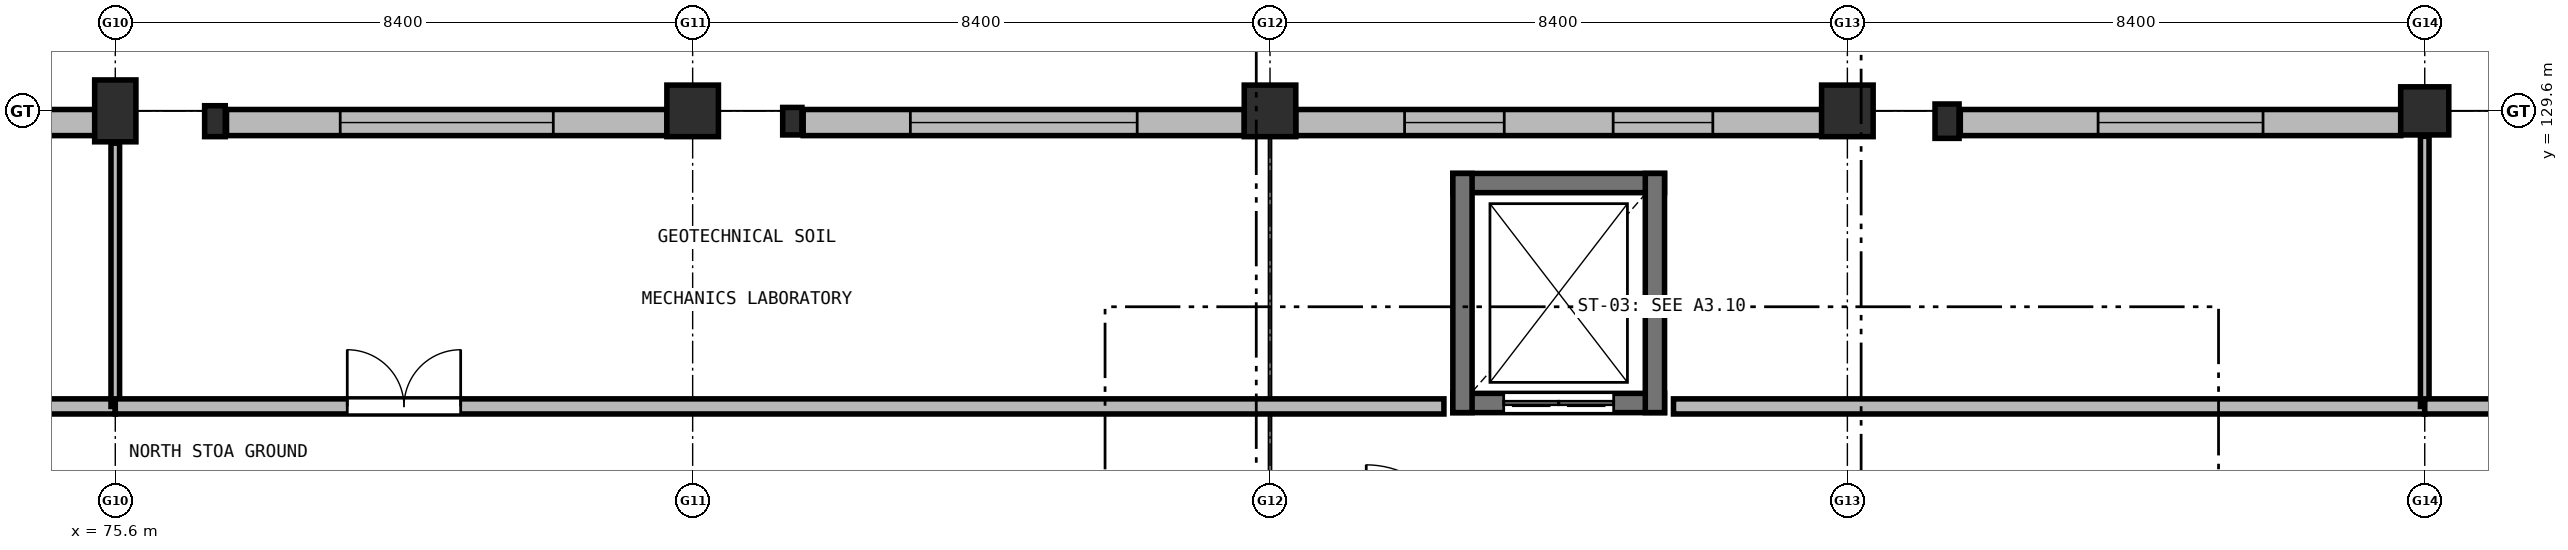
"""IFC4 building model, lengths in metres.
Left out: names, types, materials, properties, quantities, classifications, styles, units other than length and angle.
Written with IfcOpenShell. Run it as: python <this file> out.ifc"""

import sys

from ifc_helpers import new_model, si_unit, direction, frame, frame_2d, origin, origin_2d, place, context, subcontext, project, spatial, rectangle, extrude, element, fill, save


model = new_model("IFC4")
c1 = context("Model", 3, precision=1e-05, world=origin(), true_north=direction((0.0, 1.0)))
c2 = subcontext(c1, "Body", "Model", "MODEL_VIEW")
j1 = project(units=[si_unit("LENGTHUNIT", "METRE"), si_unit("PLANEANGLEUNIT", "RADIAN")], contexts=[c1])
p1 = place(None, origin())
s1 = spatial("IfcSite", under=j1, at=p1, CompositionType="ELEMENT")
p2 = place(p1, origin())
s2 = spatial("IfcBuilding", under=s1, at=p2, CompositionType="ELEMENT")
p3 = place(p2, origin())
s3 = spatial("IfcBuildingStorey", under=s2, at=p3, CompositionType="ELEMENT", Elevation=0.0)
p4 = place(p3, frame((75.6, 129.6, 0.0), z_axis=(0.0, 0.0, 1.0), x_axis=(1.0, 0.0, 0.0)))
e1 = element("IfcColumn", 1, at=p4, inside=s3, PredefinedType="COLUMN", context=c2, shape_type="SweptSolid", body=[
    extrude(rectangle(XDim=0.6, YDim=0.9, at=origin_2d()), origin(), (0.0, 0.0, 1.0), 5.1),
])
for number, where, z_axis, x_axis in (
    (2, (84.0, 129.6, 0.0), (0.0, 0.0, 1.0), (1.0, 0.0, 0.0)),
    (3, (92.4, 129.6, 0.0), (0.0, 0.0, 1.0), (1.0, 0.0, 0.0)),
    (4, (100.8, 129.6, 0.0), (0.0, 0.0, 1.0), (1.0, 0.0, 0.0)),
):
    element("IfcColumn", number, at=place(p3, frame(where, z_axis=z_axis, x_axis=x_axis)), inside=s3, PredefinedType="COLUMN", context=c2, shape_type="SweptSolid", body=[
        extrude(rectangle(XDim=0.75, YDim=0.75, at=origin_2d()), origin(), (0.0, 0.0, 1.0), 5.1),
    ])
p5 = place(p3, frame((109.2, 129.6, 0.0), z_axis=(0.0, 0.0, 1.0), x_axis=(1.0, 0.0, 0.0)))
e5 = element("IfcColumn", 5, at=p5, inside=s3, PredefinedType="COLUMN", context=c2, shape_type="SweptSolid", body=[
    extrude(rectangle(XDim=0.7, YDim=0.7, at=origin_2d()), origin(), (0.0, 0.0, 1.0), 5.1),
])
p6 = place(p3, frame((77.05, 129.45, 0.0), z_axis=(0.0, 0.0, 1.0), x_axis=(1.0, 0.0, 0.0)))
e6 = element("IfcColumn", 6, at=p6, inside=s3, PredefinedType="PILASTER", context=c2, shape_type="SweptSolid", body=[
    extrude(rectangle(XDim=0.3, YDim=0.45, at=origin_2d()), origin(), (0.0, 0.0, 1.0), 4.15),
])
p7 = place(p3, frame((85.45, 129.45, 0.0), z_axis=(0.0, 0.0, 1.0), x_axis=(1.0, 0.0, 0.0)))
e7 = element("IfcColumn", 7, at=p7, inside=s3, PredefinedType="PILASTER", context=c2, shape_type="SweptSolid", body=[
    extrude(rectangle(XDim=0.28, YDim=0.4, at=origin_2d()), origin(), (0.0, 0.0, 1.0), 4.15),
])
p8 = place(p3, frame((102.25, 129.45, 0.0), z_axis=(0.0, 0.0, 1.0), x_axis=(1.0, 0.0, 0.0)))
e8 = element("IfcColumn", 8, at=p8, inside=s3, PredefinedType="PILASTER", context=c2, shape_type="SweptSolid", body=[
    extrude(rectangle(XDim=0.35, YDim=0.5, at=origin_2d()), origin(), (0.0, 0.0, 1.0), 4.15),
])
p9 = place(p3, frame((67.498, 129.43, 0.0), z_axis=(0.0, 0.0, 1.0), x_axis=(1.0, 0.0, 0.0)))
e9 = element("IfcWall", 9, at=p9, inside=s3, PredefinedType="SOLIDWALL", context=c2, shape_type="SweptSolid", body=[
    extrude(rectangle(XDim=7.804, YDim=0.38, at=frame_2d((3.902, 0.0))), origin(), (0.0, 0.0, 1.0), 4.01),
])
p10 = place(p9, frame((2.452, 0.0, 0.95)))
e10 = element("IfcOpeningElement", 10, at=p10, cuts=e9, PredefinedType="OPENING", context=c2, shape_type="SweptSolid", body=[
    extrude(rectangle(XDim=2.9, YDim=1.75, at=frame_2d((1.45, 0.875))), frame((0.0, 0.2, 0.0), z_axis=(0.0, -1.0, 0.0), x_axis=(1.0, 0.0, 0.0)), (0.0, 0.0, 1.0), 0.4),
])
p11 = place(p3, frame((77.218, 129.43, 0.0), z_axis=(0.0, 0.0, 1.0), x_axis=(1.0, 0.0, 0.0)))
e11 = element("IfcWall", 11, at=p11, inside=s3, PredefinedType="SOLIDWALL", context=c2, shape_type="SweptSolid", body=[
    extrude(rectangle(XDim=6.409, YDim=0.38, at=frame_2d((3.205, 0.0))), origin(), (0.0, 0.0, 1.0), 4.01),
])
p12 = place(p11, frame((1.655, 0.0, 0.95)))
e12 = element("IfcOpeningElement", 12, at=p12, cuts=e11, PredefinedType="OPENING", context=c2, shape_type="SweptSolid", body=[
    extrude(rectangle(XDim=3.1, YDim=1.95, at=frame_2d((1.55, 0.975))), frame((0.0, 0.2, 0.0), z_axis=(0.0, -1.0, 0.0), x_axis=(1.0, 0.0, 0.0)), (0.0, 0.0, 1.0), 0.4),
])
p13 = place(p3, frame((85.608, 129.43, 0.0), z_axis=(0.0, 0.0, 1.0), x_axis=(1.0, 0.0, 0.0)))
e13 = element("IfcWall", 13, at=p13, inside=s3, PredefinedType="SOLIDWALL", context=c2, shape_type="SweptSolid", body=[
    extrude(rectangle(XDim=6.419, YDim=0.38, at=frame_2d((3.209, 0.0))), origin(), (0.0, 0.0, 1.0), 4.01),
])
p14 = place(p13, frame((1.56, 0.0, 0.95)))
e14 = element("IfcOpeningElement", 14, at=p14, cuts=e13, PredefinedType="OPENING", context=c2, shape_type="SweptSolid", body=[
    extrude(rectangle(XDim=3.3, YDim=1.65, at=frame_2d((1.65, 0.825))), frame((0.0, 0.2, 0.0), z_axis=(0.0, -1.0, 0.0), x_axis=(1.0, 0.0, 0.0)), (0.0, 0.0, 1.0), 0.4),
])
p15 = place(p3, frame((92.773, 129.43, 0.0), z_axis=(0.0, 0.0, 1.0), x_axis=(1.0, 0.0, 0.0)))
e15 = element("IfcWall", 15, at=p15, inside=s3, PredefinedType="SOLIDWALL", context=c2, shape_type="SweptSolid", body=[
    extrude(rectangle(XDim=7.654, YDim=0.38, at=frame_2d((3.827, 0.0))), origin(), (0.0, 0.0, 1.0), 4.01),
])
p16 = place(p15, frame((1.585, 0.0, 0.95)))
e16 = element("IfcOpeningElement", 16, at=p16, cuts=e15, PredefinedType="OPENING", context=c2, shape_type="SweptSolid", body=[
    extrude(rectangle(XDim=1.45, YDim=1.85, at=frame_2d((0.725, 0.925))), frame((0.0, 0.2, 0.0), z_axis=(0.0, -1.0, 0.0), x_axis=(1.0, 0.0, 0.0)), (0.0, 0.0, 1.0), 0.4),
])
p17 = place(p15, frame((4.619, 0.0, 0.95)))
e17 = element("IfcOpeningElement", 17, at=p17, cuts=e15, PredefinedType="OPENING", context=c2, shape_type="SweptSolid", body=[
    extrude(rectangle(XDim=1.45, YDim=1.85, at=frame_2d((0.725, 0.925))), frame((0.0, 0.2, 0.0), z_axis=(0.0, -1.0, 0.0), x_axis=(1.0, 0.0, 0.0)), (0.0, 0.0, 1.0), 0.4),
])
p18 = place(p3, frame((102.443, 129.43, 0.0), z_axis=(0.0, 0.0, 1.0), x_axis=(1.0, 0.0, 0.0)))
e18 = element("IfcWall", 18, at=p18, inside=s3, PredefinedType="SOLIDWALL", context=c2, shape_type="SweptSolid", body=[
    extrude(rectangle(XDim=6.409, YDim=0.38, at=frame_2d((3.205, 0.0))), origin(), (0.0, 0.0, 1.0), 4.01),
])
p19 = place(p18, frame((2.004, 0.0, 0.95)))
e19 = element("IfcOpeningElement", 19, at=p19, cuts=e18, PredefinedType="OPENING", context=c2, shape_type="SweptSolid", body=[
    extrude(rectangle(XDim=2.4, YDim=2.1, at=frame_2d((1.2, 1.05))), frame((0.0, 0.2, 0.0), z_axis=(0.0, -1.0, 0.0), x_axis=(1.0, 0.0, 0.0)), (0.0, 0.0, 1.0), 0.4),
])
p20 = place(p3, frame((98.14, 125.35, 0.0), z_axis=(0.0, 0.0, 1.0), x_axis=(-1.0, 0.0, 0.0)))
e20 = element("IfcWall", 20, at=p20, inside=s3, PredefinedType="SHEAR", context=c2, shape_type="SweptSolid", body=[
    extrude(rectangle(XDim=3.08, YDim=0.28, at=frame_2d((1.54, 0.0))), origin(), (0.0, 0.0, 1.0), 4.82),
])
p21 = place(p20, frame((0.74, 0.0, 0.0)))
e21 = element("IfcOpeningElement", 21, at=p21, cuts=e20, PredefinedType="OPENING", context=c2, shape_type="SweptSolid", body=[
    extrude(rectangle(XDim=1.6, YDim=2.2, at=frame_2d((0.8, 1.1))), frame((0.0, 0.15, 0.0), z_axis=(0.0, -1.0, 0.0), x_axis=(1.0, 0.0, 0.0)), (0.0, 0.0, 1.0), 0.3),
])
p22 = place(p3, frame((95.06, 128.55, 0.0), z_axis=(0.0, 0.0, 1.0), x_axis=(1.0, 0.0, 0.0)))
e22 = element("IfcWall", 22, at=p22, inside=s3, PredefinedType="SHEAR", context=c2, shape_type="SweptSolid", body=[
    extrude(rectangle(XDim=3.08, YDim=0.28, at=frame_2d((1.54, 0.0))), origin(), (0.0, 0.0, 1.0), 4.82),
])
for number, where, z_axis, x_axis in (
    (23, (95.2, 125.21, 0.0), (0.0, 0.0, 1.0), (0.0, 1.0, 0.0)),
    (24, (98.0, 128.69, 0.0), (0.0, 0.0, 1.0), (0.0, -1.0, 0.0)),
):
    element("IfcWall", number, at=place(p3, frame(where, z_axis=z_axis, x_axis=x_axis)), inside=s3, PredefinedType="SHEAR", context=c2, shape_type="SweptSolid", body=[
        extrude(rectangle(XDim=3.48, YDim=0.28, at=frame_2d((1.74, 0.0))), origin(), (0.0, 0.0, 1.0), 4.82),
    ])
p23 = place(p3, frame((56.07, 125.3, 0.0), z_axis=(0.0, 0.0, 1.0), x_axis=(1.0, 0.0, 0.0)))
e25 = element("IfcWall", 25, at=p23, inside=s3, PredefinedType="SOLIDWALL", context=c2, shape_type="SweptSolid", body=[
    extrude(rectangle(XDim=19.53, YDim=0.22, at=frame_2d((9.765, 0.0))), origin(), (0.0, 0.0, 1.0), 4.105),
])
p24 = place(p3, frame((75.6, 125.3, 0.0), z_axis=(0.0, 0.0, 1.0), x_axis=(0.0, 1.0, 0.0)))
e26 = element("IfcWall", 26, at=p24, inside=s3, PredefinedType="PARTITIONING", context=c2, shape_type="SweptSolid", body=[
    extrude(rectangle(XDim=3.83, YDim=0.125, at=frame_2d((1.915, 0.0))), origin(), (0.0, 0.0, 1.0), 4.105),
])
p25 = place(p3, frame((75.6, 125.3, 0.0), z_axis=(0.0, 0.0, 1.0), x_axis=(1.0, 0.0, 0.0)))
e27 = element("IfcWall", 27, at=p25, inside=s3, PredefinedType="SOLIDWALL", context=c2, shape_type="SweptSolid", body=[
    extrude(rectangle(XDim=19.33, YDim=0.22, at=frame_2d((9.665, 0.0))), origin(), (0.0, 0.0, 1.0), 4.105),
])
p26 = place(p25, frame((3.375, 0.0, 0.0)))
e28 = element("IfcOpeningElement", 28, at=p26, cuts=e27, PredefinedType="OPENING", context=c2, shape_type="SweptSolid", body=[
    extrude(rectangle(XDim=1.65, YDim=2.2, at=frame_2d((0.825, 1.1))), frame((0.0, 0.12, 0.0), z_axis=(0.0, -1.0, 0.0), x_axis=(1.0, 0.0, 0.0)), (0.0, 0.0, 1.0), 0.24),
])
p27 = place(p3, frame((98.27, 125.3, 0.0), z_axis=(0.0, 0.0, 1.0), x_axis=(1.0, 0.0, 0.0)))
e29 = element("IfcWall", 29, at=p27, inside=s3, PredefinedType="SOLIDWALL", context=c2, shape_type="SweptSolid", body=[
    extrude(rectangle(XDim=10.93, YDim=0.22, at=frame_2d((5.465, 0.0))), origin(), (0.0, 0.0, 1.0), 4.105),
])
p28 = place(p3, frame((109.2, 125.3, 0.0), z_axis=(0.0, 0.0, 1.0), x_axis=(0.0, 1.0, 0.0)))
e30 = element("IfcWall", 30, at=p28, inside=s3, PredefinedType="PARTITIONING", context=c2, shape_type="SweptSolid", body=[
    extrude(rectangle(XDim=3.93, YDim=0.125, at=frame_2d((1.965, 0.0))), origin(), (0.0, 0.0, 1.0), 4.005),
])
p29 = place(p3, frame((109.2, 125.3, 0.0), z_axis=(0.0, 0.0, 1.0), x_axis=(1.0, 0.0, 0.0)))
e31 = element("IfcWall", 31, at=p29, inside=s3, PredefinedType="SOLIDWALL", context=c2, shape_type="SweptSolid", body=[
    extrude(rectangle(XDim=24.98, YDim=0.22, at=frame_2d((12.49, 0.0))), origin(), (0.0, 0.0, 1.0), 4.105),
])
p30 = place(p29, frame((3.55, 0.0, 0.0)))
e32 = element("IfcOpeningElement", 32, at=p30, cuts=e31, PredefinedType="OPENING", context=c2, shape_type="SweptSolid", body=[
    extrude(rectangle(XDim=1.3, YDim=2.15, at=frame_2d((0.65, 1.075))), frame((0.0, 0.12, 0.0), z_axis=(0.0, -1.0, 0.0), x_axis=(1.0, 0.0, 0.0)), (0.0, 0.0, 1.0), 0.24),
])
p31 = place(p12, origin())
e33 = element("IfcWindow", 33, at=p31, inside=s3, PartitioningType="SINGLE_PANEL", PredefinedType="WINDOW", context=c2, shape_type="SweptSolid", body=[
    extrude(rectangle(XDim=3.1, YDim=1.95, at=frame_2d((1.55, 0.975))), frame((0.0, 0.03, 0.0), z_axis=(0.0, -1.0, 0.0), x_axis=(1.0, 0.0, 0.0)), (0.0, 0.0, 1.0), 0.06),
])
fill(e12, e33)
p32 = place(p14, origin())
e34 = element("IfcWindow", 34, at=p32, inside=s3, PartitioningType="SINGLE_PANEL", PredefinedType="WINDOW", context=c2, shape_type="SweptSolid", body=[
    extrude(rectangle(XDim=3.3, YDim=1.65, at=frame_2d((1.65, 0.825))), frame((0.0, 0.03, 0.0), z_axis=(0.0, -1.0, 0.0), x_axis=(1.0, 0.0, 0.0)), (0.0, 0.0, 1.0), 0.06),
])
fill(e14, e34)
p33 = place(p16, origin())
e35 = element("IfcWindow", 35, at=p33, inside=s3, PartitioningType="SINGLE_PANEL", PredefinedType="WINDOW", context=c2, shape_type="SweptSolid", body=[
    extrude(rectangle(XDim=1.45, YDim=1.85, at=frame_2d((0.725, 0.925))), frame((0.0, 0.03, 0.0), z_axis=(0.0, -1.0, 0.0), x_axis=(1.0, 0.0, 0.0)), (0.0, 0.0, 1.0), 0.06),
])
fill(e16, e35)
p34 = place(p17, origin())
e36 = element("IfcWindow", 36, at=p34, inside=s3, PartitioningType="SINGLE_PANEL", PredefinedType="WINDOW", context=c2, shape_type="SweptSolid", body=[
    extrude(rectangle(XDim=1.45, YDim=1.85, at=frame_2d((0.725, 0.925))), frame((0.0, 0.03, 0.0), z_axis=(0.0, -1.0, 0.0), x_axis=(1.0, 0.0, 0.0)), (0.0, 0.0, 1.0), 0.06),
])
fill(e17, e36)
p35 = place(p19, origin())
e37 = element("IfcWindow", 37, at=p35, inside=s3, PartitioningType="SINGLE_PANEL", PredefinedType="WINDOW", context=c2, shape_type="SweptSolid", body=[
    extrude(rectangle(XDim=2.4, YDim=2.1, at=frame_2d((1.2, 1.05))), frame((0.0, 0.03, 0.0), z_axis=(0.0, -1.0, 0.0), x_axis=(1.0, 0.0, 0.0)), (0.0, 0.0, 1.0), 0.06),
])
fill(e19, e37)
p36 = place(p21, origin())
e38 = element("IfcDoor", 38, at=p36, inside=s3, OperationType="DOUBLE_DOOR_SLIDING", PredefinedType="DOOR", context=c2, shape_type="SweptSolid", body=[
    extrude(rectangle(XDim=1.6, YDim=2.2, at=frame_2d((0.8, 1.1))), frame((0.0, 0.025, 0.0), z_axis=(0.0, -1.0, 0.0), x_axis=(1.0, 0.0, 0.0)), (0.0, 0.0, 1.0), 0.05),
])
fill(e21, e38)
p37 = place(p26, origin())
e39 = element("IfcDoor", 39, at=p37, inside=s3, OperationType="DOUBLE_DOOR_SINGLE_SWING", PredefinedType="DOOR", context=c2, shape_type="SweptSolid", body=[
    extrude(rectangle(XDim=1.65, YDim=2.2, at=frame_2d((0.825, 1.1))), frame((0.0, 0.025, 0.0), z_axis=(0.0, -1.0, 0.0), x_axis=(1.0, 0.0, 0.0)), (0.0, 0.0, 1.0), 0.05),
])
fill(e28, e39)
save(model, sys.argv[1])
